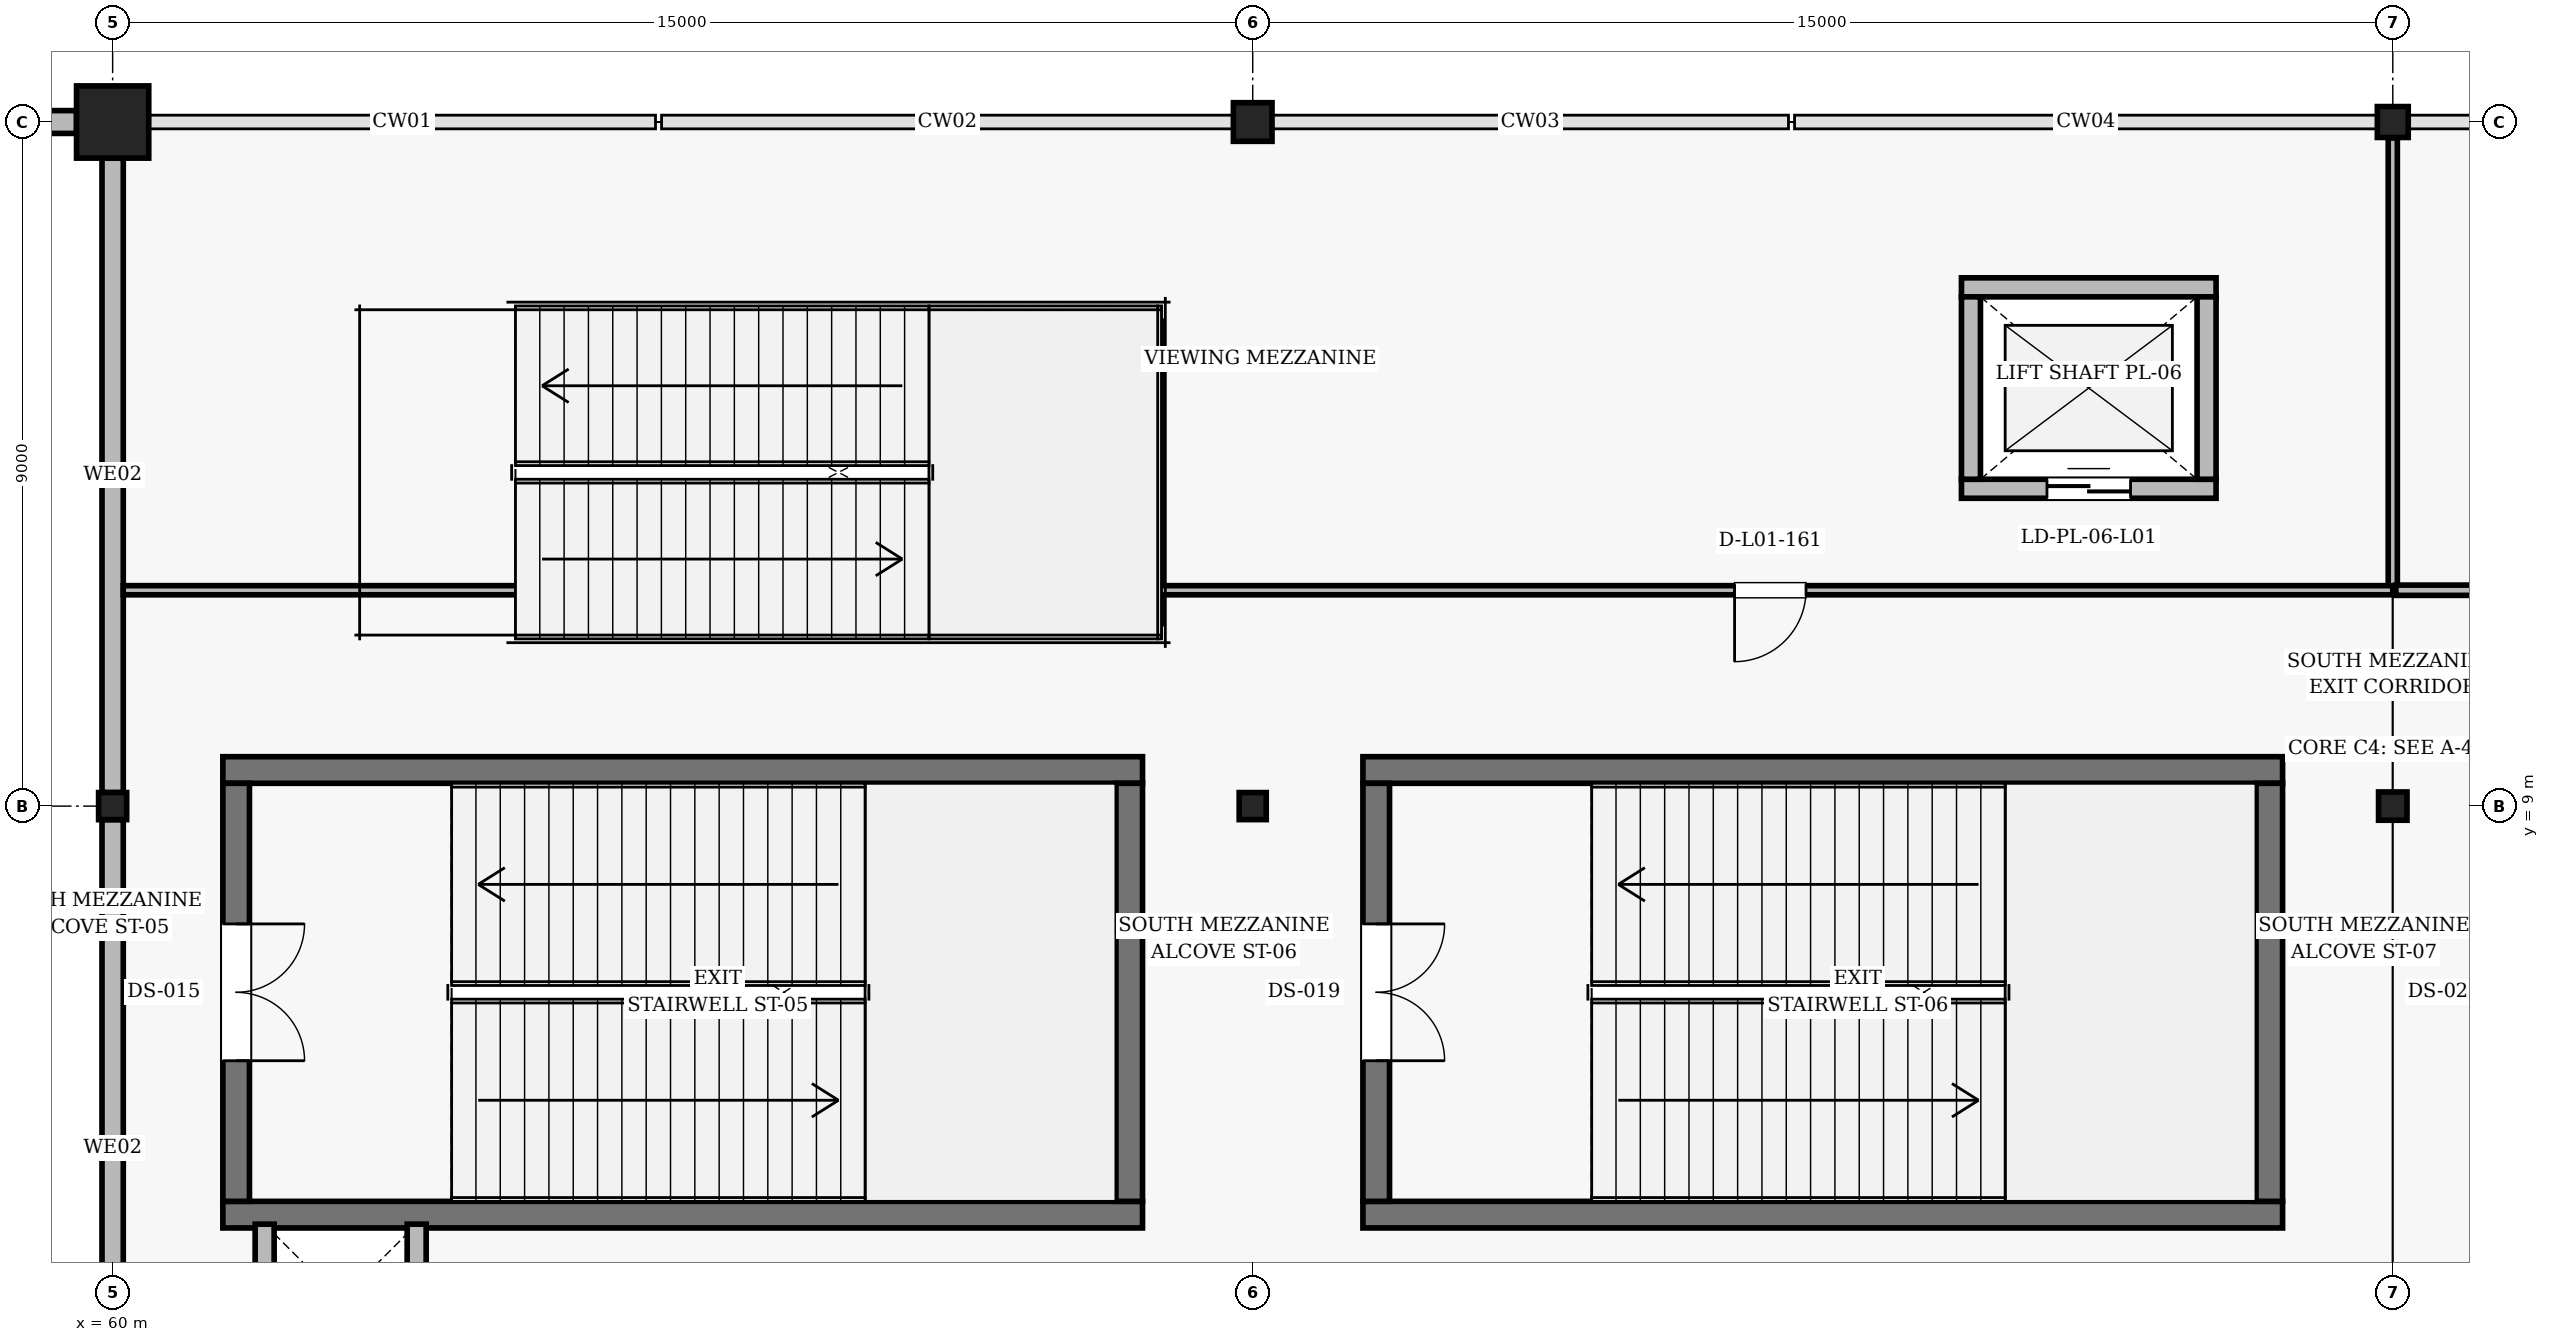
"""IFC4 building model, lengths in metres.
Left out: names, types, materials, properties, quantities, classifications, styles, units other than length and angle.
Written with IfcOpenShell. Run it as: python <this file> out.ifc"""

import sys

from ifc_helpers import new_model, si_unit, direction, frame, frame_2d, origin, origin_2d, place, context, subcontext, project, spatial, rectangle, hollow_circle, i_section, extrude, element, fill, save


model = new_model("IFC4")
c1 = context("Model", 3, precision=1e-05, world=origin(), true_north=direction((0.0, 1.0)))
c2 = subcontext(c1, "Body", "Model", "MODEL_VIEW")
j1 = project(units=[si_unit("LENGTHUNIT", "METRE"), si_unit("PLANEANGLEUNIT", "RADIAN")], contexts=[c1])
p1 = place(None, origin())
s1 = spatial("IfcSite", under=j1, at=p1, CompositionType="ELEMENT")
p2 = place(p1, origin())
s2 = spatial("IfcBuilding", under=s1, at=p2, CompositionType="ELEMENT")
p3 = place(p2, frame((0.0, 0.0, 5.4)))
s3 = spatial("IfcBuildingStorey", under=s2, at=p3, CompositionType="ELEMENT", Elevation=5.4)
p4 = place(p3, frame((60.0, 9.0, 0.0), z_axis=(0.0, 0.0, 1.0), x_axis=(1.0, 0.0, 0.0)))
e1 = element("IfcColumn", 1, at=p4, inside=s3, PredefinedType="COLUMN", context=c2, shape_type="SweptSolid", body=[
    extrude(i_section(OverallWidth=0.369, OverallDepth=0.356, WebThickness=0.011, FlangeThickness=0.018, FilletRadius=0.015, at=origin_2d()), origin(), (0.0, 0.0, 1.0), 5.4),
])
p5 = place(p3, frame((60.0, 18.0, 0.0), z_axis=(0.0, 0.0, 1.0), x_axis=(1.0, 0.0, 0.0)))
e2 = element("IfcColumn", 2, at=p5, inside=s3, PredefinedType="COLUMN", context=c2, shape_type="SweptSolid", body=[
    extrude(rectangle(XDim=0.95, YDim=0.95, at=origin_2d()), origin(), (0.0, 0.0, 1.0), 5.4),
])
p6 = place(p3, frame((75.0, 9.0, 0.0), z_axis=(0.0, 0.0, 1.0), x_axis=(1.0, 0.0, 0.0)))
e3 = element("IfcColumn", 3, at=p6, inside=s3, PredefinedType="COLUMN", context=c2, shape_type="SweptSolid", body=[
    extrude(hollow_circle(Radius=0.178, WallThickness=0.016, at=origin_2d()), origin(), (0.0, 0.0, 1.0), 5.4),
])
p7 = place(p3, frame((75.0, 18.0, 0.0), z_axis=(0.0, 0.0, 1.0), x_axis=(1.0, 0.0, 0.0)))
e4 = element("IfcColumn", 4, at=p7, inside=s3, PredefinedType="COLUMN", context=c2, shape_type="SweptSolid", body=[
    extrude(hollow_circle(Radius=0.254, WallThickness=0.02, at=origin_2d()), origin(), (0.0, 0.0, 1.0), 5.4),
])
p8 = place(p3, frame((90.0, 9.0, 0.0), z_axis=(0.0, 0.0, 1.0), x_axis=(1.0, 0.0, 0.0)))
e5 = element("IfcColumn", 5, at=p8, inside=s3, PredefinedType="COLUMN", context=c2, shape_type="SweptSolid", body=[
    extrude(i_section(OverallWidth=0.374, OverallDepth=0.372, WebThickness=0.016, FlangeThickness=0.026, FilletRadius=0.016, at=origin_2d()), origin(), (0.0, 0.0, 1.0), 5.4),
])
p9 = place(p3, frame((90.0, 18.0, 0.0), z_axis=(0.0, 0.0, 1.0), x_axis=(1.0, 0.0, 0.0)))
e6 = element("IfcColumn", 6, at=p9, inside=s3, PredefinedType="COLUMN", context=c2, shape_type="SweptSolid", body=[
    extrude(hollow_circle(Radius=0.203, WallThickness=0.016, at=origin_2d()), origin(), (0.0, 0.0, 1.0), 5.4),
])
p10 = place(p3, frame((59.525, 18.0, 0.0), z_axis=(0.0, 0.0, 1.0), x_axis=(-1.0, 0.0, 0.0)))
e7 = element("IfcWall", 7, at=p10, inside=s3, PredefinedType="SOLIDWALL", context=c2, shape_type="SweptSolid", body=[
    extrude(rectangle(XDim=14.322, YDim=0.3, at=frame_2d((7.161, 0.0))), origin(), (0.0, 0.0, 1.0), 4.919),
])
p11 = place(p3, frame((60.0, 0.186, 0.0), z_axis=(0.0, 0.0, 1.0), x_axis=(0.0, 1.0, 0.0)))
e8 = element("IfcWall", 8, at=p11, inside=s3, PredefinedType="SOLIDWALL", context=c2, shape_type="SweptSolid", body=[
    extrude(rectangle(XDim=8.636, YDim=0.28, at=frame_2d((4.318, 0.0))), origin(), (0.0, 0.0, 1.0), 4.392),
])
p12 = place(p3, frame((60.0, 9.178, 0.0), z_axis=(0.0, 0.0, 1.0), x_axis=(0.0, 1.0, 0.0)))
e9 = element("IfcWall", 9, at=p12, inside=s3, PredefinedType="SOLIDWALL", context=c2, shape_type="SweptSolid", body=[
    extrude(rectangle(XDim=8.347, YDim=0.28, at=frame_2d((4.173, 0.0))), origin(), (0.0, 0.0, 1.0), 4.47),
])
for number, where, z_axis, x_axis in (
    (10, (61.45, 3.625, 0.0), (0.0, 0.0, 1.0), (1.0, 0.0, 0.0)),
    (11, (73.55, 9.475, 0.0), (0.0, 0.0, 1.0), (-1.0, 0.0, 0.0)),
):
    element("IfcWall", number, at=place(p3, frame(where, z_axis=z_axis, x_axis=x_axis)), inside=s3, PredefinedType="SHEAR", context=c2, shape_type="SweptSolid", body=[
        extrude(rectangle(XDim=12.1, YDim=0.35, at=frame_2d((6.05, 0.0))), origin(), (0.0, 0.0, 1.0), 5.18),
    ])
p13 = place(p3, frame((61.625, 9.3, 0.0), z_axis=(0.0, 0.0, 1.0), x_axis=(0.0, -1.0, 0.0)))
e12 = element("IfcWall", 12, at=p13, inside=s3, PredefinedType="SHEAR", context=c2, shape_type="SweptSolid", body=[
    extrude(rectangle(XDim=5.5, YDim=0.35, at=frame_2d((2.75, 0.0))), origin(), (0.0, 0.0, 1.0), 5.18),
])
p14 = place(p13, frame((1.85, 0.0, 0.0)))
e13 = element("IfcOpeningElement", 13, at=p14, cuts=e12, PredefinedType="OPENING", context=c2, shape_type="SweptSolid", body=[
    extrude(rectangle(XDim=1.8, YDim=2.2, at=frame_2d((0.9, 1.1))), frame((0.0, 0.185, 0.0), z_axis=(0.0, -1.0, 0.0), x_axis=(1.0, 0.0, 0.0)), (0.0, 0.0, 1.0), 0.37),
])
p15 = place(p3, frame((73.375, 3.8, 0.0), z_axis=(0.0, 0.0, 1.0), x_axis=(0.0, 1.0, 0.0)))
e14 = element("IfcWall", 14, at=p15, inside=s3, PredefinedType="SHEAR", context=c2, shape_type="SweptSolid", body=[
    extrude(rectangle(XDim=5.5, YDim=0.35, at=frame_2d((2.75, 0.0))), origin(), (0.0, 0.0, 1.0), 5.18),
])
for number, where, z_axis, x_axis in (
    (15, (76.45, 3.625, 0.0), (0.0, 0.0, 1.0), (1.0, 0.0, 0.0)),
    (16, (88.55, 9.475, 0.0), (0.0, 0.0, 1.0), (-1.0, 0.0, 0.0)),
):
    element("IfcWall", number, at=place(p3, frame(where, z_axis=z_axis, x_axis=x_axis)), inside=s3, PredefinedType="SHEAR", context=c2, shape_type="SweptSolid", body=[
        extrude(rectangle(XDim=12.1, YDim=0.35, at=frame_2d((6.05, 0.0))), origin(), (0.0, 0.0, 1.0), 5.18),
    ])
p16 = place(p3, frame((76.625, 9.3, 0.0), z_axis=(0.0, 0.0, 1.0), x_axis=(0.0, -1.0, 0.0)))
e17 = element("IfcWall", 17, at=p16, inside=s3, PredefinedType="SHEAR", context=c2, shape_type="SweptSolid", body=[
    extrude(rectangle(XDim=5.5, YDim=0.35, at=frame_2d((2.75, 0.0))), origin(), (0.0, 0.0, 1.0), 5.18),
])
p17 = place(p16, frame((1.85, 0.0, 0.0)))
e18 = element("IfcOpeningElement", 18, at=p17, cuts=e17, PredefinedType="OPENING", context=c2, shape_type="SweptSolid", body=[
    extrude(rectangle(XDim=1.8, YDim=2.2, at=frame_2d((0.9, 1.1))), frame((0.0, 0.185, 0.0), z_axis=(0.0, -1.0, 0.0), x_axis=(1.0, 0.0, 0.0)), (0.0, 0.0, 1.0), 0.37),
])
p18 = place(p3, frame((88.375, 3.8, 0.0), z_axis=(0.0, 0.0, 1.0), x_axis=(0.0, 1.0, 0.0)))
e19 = element("IfcWall", 19, at=p18, inside=s3, PredefinedType="SHEAR", context=c2, shape_type="SweptSolid", body=[
    extrude(rectangle(XDim=5.5, YDim=0.35, at=frame_2d((2.75, 0.0))), origin(), (0.0, 0.0, 1.0), 5.18),
])
for number, where, z_axis, x_axis in (
    (20, (70.82, 11.4, 0.0), (0.0, 0.0, 1.0), (1.0, 0.0, 0.0)),
    (21, (70.82, 15.38, 0.0), (0.0, 0.0, 1.0), (1.0, 0.0, 0.0)),
):
    element("IfcWall", number, at=place(p3, frame(where, z_axis=z_axis, x_axis=x_axis)), inside=s3, PredefinedType="SHEAR", context=c2, shape_type="SweptSolid", body=[
        extrude(rectangle(XDim=2.8, YDim=0.35, at=frame_2d((1.4, 0.0))), origin(), (0.0, 0.0, 1.0), 2.5),
    ])
p19 = place(p3, frame((73.62, 11.4, 0.0), z_axis=(0.0, 0.0, 1.0), x_axis=(0.0, 1.0, 0.0)))
e22 = element("IfcWall", 22, at=p19, inside=s3, PredefinedType="SHEAR", context=c2, shape_type="SweptSolid", body=[
    extrude(rectangle(XDim=3.98, YDim=0.35, at=frame_2d((1.99, 0.0))), origin(), (0.0, 0.0, 1.0), 2.5),
])
p20 = place(p3, frame((84.325, 13.175, 0.0), z_axis=(0.0, 0.0, 1.0), x_axis=(1.0, 0.0, 0.0)))
e23 = element("IfcWall", 23, at=p20, inside=s3, PredefinedType="SOLIDWALL", context=c2, shape_type="SweptSolid", body=[
    extrude(rectangle(XDim=3.35, YDim=0.25, at=frame_2d((1.675, 0.0))), origin(), (0.0, 0.0, 1.0), 5.16),
])
p21 = place(p20, frame((1.125, 0.0, 0.0)))
e24 = element("IfcOpeningElement", 24, at=p21, cuts=e23, PredefinedType="OPENING", context=c2, shape_type="SweptSolid", body=[
    extrude(rectangle(XDim=1.1, YDim=2.2, at=frame_2d((0.55, 1.1))), frame((0.0, 0.135, 0.0), z_axis=(0.0, -1.0, 0.0), x_axis=(1.0, 0.0, 0.0)), (0.0, 0.0, 1.0), 0.27),
])
p22 = place(p3, frame((87.675, 15.825, 0.0), z_axis=(0.0, 0.0, 1.0), x_axis=(-1.0, 0.0, 0.0)))
e25 = element("IfcWall", 25, at=p22, inside=s3, PredefinedType="SOLIDWALL", context=c2, shape_type="SweptSolid", body=[
    extrude(rectangle(XDim=3.35, YDim=0.25, at=frame_2d((1.675, 0.0))), origin(), (0.0, 0.0, 1.0), 5.16),
])
for number, where, z_axis, x_axis in (
    (26, (84.45, 15.7, 0.0), (0.0, 0.0, 1.0), (0.0, -1.0, 0.0)),
    (27, (87.55, 13.3, 0.0), (0.0, 0.0, 1.0), (0.0, 1.0, 0.0)),
):
    element("IfcWall", number, at=place(p3, frame(where, z_axis=z_axis, x_axis=x_axis)), inside=s3, PredefinedType="SOLIDWALL", context=c2, shape_type="SweptSolid", body=[
        extrude(rectangle(XDim=2.4, YDim=0.25, at=frame_2d((1.2, 0.0))), origin(), (0.0, 0.0, 1.0), 5.16),
    ])
p23 = place(p3, frame((90.0, 17.79, 0.0), z_axis=(0.0, 0.0, 1.0), x_axis=(0.0, -1.0, 0.0)))
e28 = element("IfcWall", 28, at=p23, inside=s3, PredefinedType="PARTITIONING", context=c2, shape_type="SweptSolid", body=[
    extrude(rectangle(XDim=5.95, YDim=0.12, at=frame_2d((2.975, 0.0))), origin(), (0.0, 0.0, 1.0), 4.554),
])
p24 = place(p3, frame((90.0, 11.84, 0.0), z_axis=(0.0, 0.0, 1.0), x_axis=(-1.0, 0.0, 0.0)))
e29 = element("IfcWall", 29, at=p24, inside=s3, PredefinedType="PARTITIONING", context=c2, shape_type="SweptSolid", body=[
    extrude(rectangle(XDim=16.38, YDim=0.12, at=frame_2d((8.19, 0.0))), origin(), (0.0, 0.0, 1.0), 4.481),
])
p25 = place(p24, frame((7.72, 0.0, 0.0)))
e30 = element("IfcOpeningElement", 30, at=p25, cuts=e29, PredefinedType="OPENING", context=c2, shape_type="SweptSolid", body=[
    extrude(rectangle(XDim=0.94, YDim=2.15, at=frame_2d((0.47, 1.075))), frame((0.0, 0.07, 0.0), z_axis=(0.0, -1.0, 0.0), x_axis=(1.0, 0.0, 0.0)), (0.0, 0.0, 1.0), 0.14),
])
p26 = place(p3, frame((70.82, 11.84, 0.0), z_axis=(0.0, 0.0, 1.0), x_axis=(-1.0, 0.0, 0.0)))
e31 = element("IfcWall", 31, at=p26, inside=s3, PredefinedType="PARTITIONING", context=c2, shape_type="SweptSolid", body=[
    extrude(rectangle(XDim=10.68, YDim=0.12, at=frame_2d((5.34, 0.0))), origin(), (0.0, 0.0, 1.0), 4.47),
])
p27 = place(p3, frame((99.35, 11.84, 0.0), z_axis=(0.0, 0.0, 1.0), x_axis=(-1.0, 0.0, 0.0)))
e32 = element("IfcWall", 32, at=p27, inside=s3, PredefinedType="PARTITIONING", context=c2, shape_type="SweptSolid", body=[
    extrude(rectangle(XDim=9.31, YDim=0.135, at=frame_2d((4.655, 0.0))), origin(), (0.0, 0.0, 1.0), 4.554),
])
for number, where, z_axis, x_axis in (
    (33, (62.0, 3.5, 0.0), (0.0, 0.0, 1.0), (0.0, -1.0, 0.0)),
    (34, (64.0, 1.5, 0.0), (0.0, 0.0, 1.0), (0.0, 1.0, 0.0)),
):
    element("IfcWall", number, at=place(p3, frame(where, z_axis=z_axis, x_axis=x_axis)), inside=s3, PredefinedType="SOLIDWALL", context=c2, shape_type="SweptSolid", body=[
        extrude(rectangle(XDim=2.0, YDim=0.25, at=frame_2d((1.0, 0.0))), origin(), (0.0, 0.0, 1.0), 4.81),
    ])
p28 = place(p14, origin())
e35 = element("IfcDoor", 35, at=p28, inside=s3, OperationType="DOUBLE_DOOR_SINGLE_SWING", PredefinedType="DOOR", context=c2, shape_type="SweptSolid", body=[
    extrude(rectangle(XDim=1.8, YDim=2.2, at=frame_2d((0.9, 1.1))), frame((0.0, 0.025, 0.0), z_axis=(0.0, -1.0, 0.0), x_axis=(1.0, 0.0, 0.0)), (0.0, 0.0, 1.0), 0.05),
])
fill(e13, e35)
p29 = place(p17, origin())
e36 = element("IfcDoor", 36, at=p29, inside=s3, OperationType="DOUBLE_DOOR_SINGLE_SWING", PredefinedType="DOOR", context=c2, shape_type="SweptSolid", body=[
    extrude(rectangle(XDim=1.8, YDim=2.2, at=frame_2d((0.9, 1.1))), frame((0.0, 0.025, 0.0), z_axis=(0.0, -1.0, 0.0), x_axis=(1.0, 0.0, 0.0)), (0.0, 0.0, 1.0), 0.05),
])
fill(e18, e36)
p30 = place(p21, origin())
e37 = element("IfcDoor", 37, at=p30, inside=s3, OperationType="DOUBLE_DOOR_SLIDING", PredefinedType="DOOR", context=c2, shape_type="SweptSolid", body=[
    extrude(rectangle(XDim=1.1, YDim=2.2, at=frame_2d((0.55, 1.1))), frame((0.0, 0.025, 0.0), z_axis=(0.0, -1.0, 0.0), x_axis=(1.0, 0.0, 0.0)), (0.0, 0.0, 1.0), 0.05),
])
fill(e24, e37)
p31 = place(p25, origin())
e38 = element("IfcDoor", 38, at=p31, inside=s3, OperationType="SINGLE_SWING_RIGHT", PredefinedType="DOOR", context=c2, shape_type="SweptSolid", body=[
    extrude(rectangle(XDim=0.94, YDim=2.15, at=frame_2d((0.47, 1.075))), frame((0.0, 0.025, 0.0), z_axis=(0.0, -1.0, 0.0), x_axis=(1.0, 0.0, 0.0)), (0.0, 0.0, 1.0), 0.05),
])
fill(e30, e38)
save(model, sys.argv[1])
